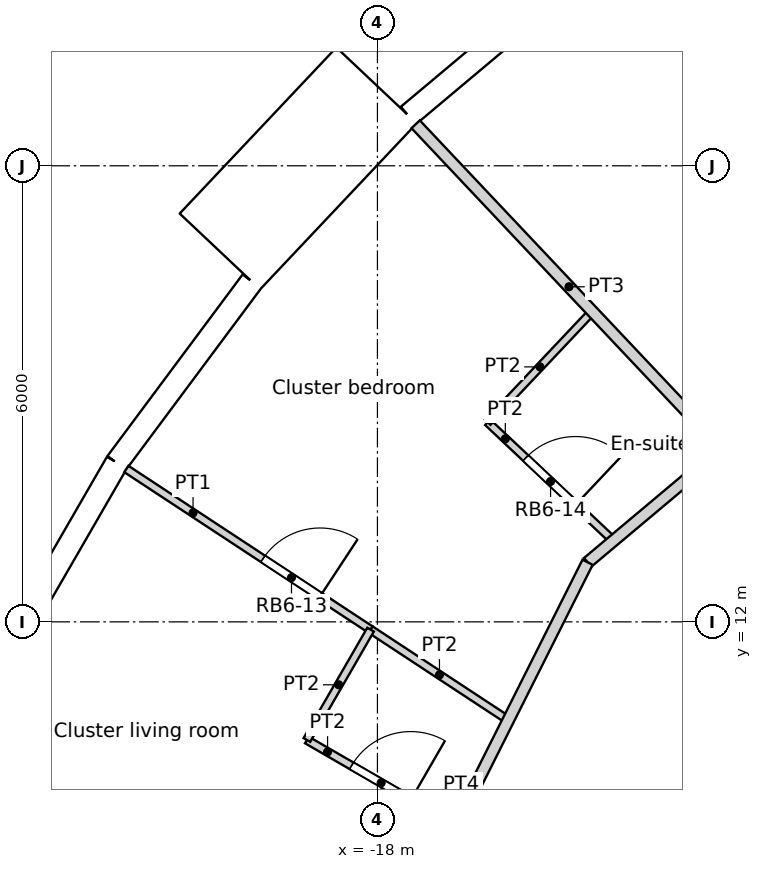
"""IFC4 building model, lengths in metres.
Left out: names, types, materials, properties, quantities, classifications, styles, units other than length and angle.
Written with IfcOpenShell. Run it as: python <this file> out.ifc"""

import sys

from ifc_helpers import new_model, si_unit, direction, frame, frame_2d, origin, origin_2d, place, context, subcontext, project, spatial, rectangle, circle, extrude, element, fill, save


model = new_model("IFC4")
c1 = context("Model", 3, precision=1e-05, world=origin(), true_north=direction((0.0, 1.0)))
c2 = subcontext(c1, "Body", "Model", "MODEL_VIEW")
j1 = project(units=[si_unit("LENGTHUNIT", "METRE"), si_unit("PLANEANGLEUNIT", "RADIAN")], contexts=[c1])
p1 = place(None, origin())
s1 = spatial("IfcSite", under=j1, at=p1, CompositionType="ELEMENT")
p2 = place(p1, origin())
s2 = spatial("IfcBuilding", under=s1, at=p2, CompositionType="ELEMENT")
p3 = place(p2, frame((0.0, 0.0, 180.0)))
s3 = spatial("IfcBuildingStorey", under=s2, at=p3, CompositionType="ELEMENT", Elevation=180.0)
for number, where, z_axis, x_axis in (
    (1, (-16.846, 17.855, 0.0), (0.0, 0.0, 1.0), (1.0, 0.0, 0.0)),
    (2, (-20.509, 13.489, 0.0), (0.0, 0.0, 1.0), (1.0, 0.0, 0.0)),
):
    element("IfcColumn", number, at=place(p3, frame(where, z_axis=z_axis, x_axis=x_axis)), inside=s3, PredefinedType="COLUMN", context=c2, shape_type="SweptSolid", body=[
        extrude(circle(Radius=0.6, at=origin_2d()), origin(), (0.0, 0.0, 1.0), 3.6),
    ])
p4 = place(p3, frame((-13.798, 12.802, 0.0), z_axis=(0.0, 0.0, 1.0), x_axis=(1.0, 0.0, 0.0)))
e3 = element("IfcColumn", 3, at=p4, inside=s3, PredefinedType="COLUMN", context=c2, shape_type="SweptSolid", body=[
    extrude(circle(Radius=0.65, at=origin_2d()), origin(), (0.0, 0.0, 1.0), 3.6),
])
p5 = place(p3, frame((-15.316, 20.573, 0.0), z_axis=(0.0, 0.0, 1.0), x_axis=(-0.766008913364, -0.642829950023, 0.0)))
e4 = element("IfcWall", 4, at=p5, inside=s3, PredefinedType="SOLIDWALL", context=c2, shape_type="SweptSolid", body=[
    extrude(rectangle(XDim=2.973, YDim=0.3, at=frame_2d((1.486, 0.0))), origin(), (0.0, 0.0, 1.0), 3.3),
])
p6 = place(p5, frame((1.486, 0.0, 1.55)))
e5 = element("IfcOpeningElement", 5, at=p6, cuts=e4, PredefinedType="OPENING", context=c2, shape_type="SweptSolid", body=[
    extrude(circle(Radius=0.9, at=origin_2d()), frame((0.0, 0.16, 0.0), z_axis=(0.0, -1.0, 0.0), x_axis=(1.0, 0.0, 0.0)), (0.0, 0.0, 1.0), 0.32),
])
p7 = place(p3, frame((-18.013, 19.056, -0.3), z_axis=(0.0, 0.0, 1.0), x_axis=(-0.686217177108, -0.727396718334, 0.0)))
e6 = element("IfcWall", 6, at=p7, inside=s3, PredefinedType="ELEMENTEDWALL", context=c2, shape_type="SweptSolid", body=[
    extrude(rectangle(XDim=3.0, YDim=1.45, at=frame_2d((1.5, 0.0))), origin(), (0.0, 0.0, 1.0), 3.6),
])
p8 = place(p7, frame((1.5, 0.0, 1.85)))
e7 = element("IfcOpeningElement", 7, at=p8, cuts=e6, PredefinedType="OPENING", context=c2, shape_type="SweptSolid", body=[
    extrude(circle(Radius=0.9, at=origin_2d()), frame((0.0, 0.735, 0.0), z_axis=(0.0, -1.0, 0.0), x_axis=(1.0, 0.0, 0.0)), (0.0, 0.0, 1.0), 1.47),
])
p9 = place(p3, frame((-19.653, 16.478, 0.0), z_axis=(0.0, 0.0, 1.0), x_axis=(-0.597197580538, -0.80209416517, 0.0)))
e8 = element("IfcWall", 8, at=p9, inside=s3, PredefinedType="SOLIDWALL", context=c2, shape_type="SweptSolid", body=[
    extrude(rectangle(XDim=2.973, YDim=0.3, at=frame_2d((1.486, 0.0))), origin(), (0.0, 0.0, 1.0), 3.3),
])
p10 = place(p9, frame((1.486, 0.0, 1.55)))
e9 = element("IfcOpeningElement", 9, at=p10, cuts=e8, PredefinedType="OPENING", context=c2, shape_type="SweptSolid", body=[
    extrude(circle(Radius=0.9, at=origin_2d()), frame((0.0, 0.16, 0.0), z_axis=(0.0, -1.0, 0.0), x_axis=(1.0, 0.0, 0.0)), (0.0, 0.0, 1.0), 0.32),
])
p11 = place(p3, frame((-21.428, 14.094, 0.0), z_axis=(0.0, 0.0, 1.0), x_axis=(-0.499954672104, -0.866051572276, 0.0)))
e10 = element("IfcWall", 10, at=p11, inside=s3, PredefinedType="SOLIDWALL", context=c2, shape_type="SweptSolid", body=[
    extrude(rectangle(XDim=2.973, YDim=0.3, at=frame_2d((1.486, 0.0))), origin(), (0.0, 0.0, 1.0), 3.3),
])
p12 = place(p11, frame((1.486, 0.0, 1.55)))
e11 = element("IfcOpeningElement", 11, at=p12, cuts=e10, PredefinedType="OPENING", context=c2, shape_type="SweptSolid", body=[
    extrude(circle(Radius=0.9, at=origin_2d()), frame((0.0, 0.16, 0.0), z_axis=(0.0, -1.0, 0.0), x_axis=(1.0, 0.0, 0.0)), (0.0, 0.0, 1.0), 0.32),
])
p13 = place(p3, frame((-15.234, 12.783, 0.0), z_axis=(0.0, 0.0, 1.0), x_axis=(0.765968036922, 0.642878656058, 0.0)))
e12 = element("IfcWall", 12, at=p13, inside=s3, PredefinedType="PARTITIONING", context=c2, shape_type="SweptSolid", body=[
    extrude(rectangle(XDim=6.906, YDim=0.15, at=frame_2d((3.453, 0.0))), origin(), (0.0, 0.0, 1.0), 3.3),
])
p14 = place(p3, frame((-19.351, 4.586, 0.0), z_axis=(0.0, 0.0, 1.0), x_axis=(0.44867140262, 0.893696801198, 0.0)))
e13 = element("IfcWall", 13, at=p14, inside=s3, PredefinedType="PARTITIONING", context=c2, shape_type="SweptSolid", body=[
    extrude(rectangle(XDim=9.174, YDim=0.15, at=frame_2d((4.587, 0.0))), origin(), (0.0, 0.0, 1.0), 3.3),
])
p15 = place(p14, frame((0.615, 0.0, 0.0)))
e14 = element("IfcOpeningElement", 14, at=p15, cuts=e13, PredefinedType="OPENING", context=c2, shape_type="SweptSolid", body=[
    extrude(rectangle(XDim=1.1, YDim=2.1, at=frame_2d((0.55, 1.05))), frame((0.0, 0.075, 0.0), z_axis=(0.0, -1.0, 0.0), x_axis=(1.0, 0.0, 0.0)), (0.0, 0.0, 1.0), 0.15),
])
p16 = place(p3, frame((-17.497, 18.546, 0.0), z_axis=(0.0, 0.0, 1.0), x_axis=(0.68633567779, -0.727284907991, 0.0)))
e15 = element("IfcWall", 15, at=p16, inside=s3, PredefinedType="PARTITIONING", context=c2, shape_type="SweptSolid", body=[
    extrude(rectangle(XDim=5.879, YDim=0.15, at=frame_2d((2.939, 0.0))), origin(), (0.0, 0.0, 1.0), 3.3),
])
p17 = place(p3, frame((-18.928, 10.446, 0.0), z_axis=(0.0, 0.0, 1.0), x_axis=(0.499835922194, 0.866120113428, 0.0)))
e16 = element("IfcWall", 16, at=p17, inside=s3, PredefinedType="PARTITIONING", context=c2, shape_type="SweptSolid", body=[
    extrude(rectangle(XDim=1.676, YDim=0.1, at=frame_2d((0.838, 0.0))), origin(), (0.0, 0.0, 1.0), 3.3),
])
p18 = place(p3, frame((-18.928, 10.446, 0.0), z_axis=(0.0, 0.0, 1.0), x_axis=(0.865942177038, -0.500144125255, 0.0)))
e17 = element("IfcWall", 17, at=p18, inside=s3, PredefinedType="PARTITIONING", context=c2, shape_type="SweptSolid", body=[
    extrude(rectangle(XDim=2.255, YDim=0.1, at=frame_2d((1.127, 0.0))), origin(), (0.0, 0.0, 1.0), 3.3),
])
p19 = place(p18, frame((0.678, 0.0, 0.0)))
e18 = element("IfcOpeningElement", 18, at=p19, cuts=e17, PredefinedType="OPENING", context=c2, shape_type="SweptSolid", body=[
    extrude(rectangle(XDim=0.9, YDim=2.0, at=frame_2d((0.45, 1.0))), frame((0.0, 0.05, 0.0), z_axis=(0.0, -1.0, 0.0), x_axis=(1.0, 0.0, 0.0)), (0.0, 0.0, 1.0), 0.1),
])
p20 = place(p3, frame((-21.303, 14.011, 0.0), z_axis=(0.0, 0.0, 1.0), x_axis=(0.835501457061, -0.549488230309, 0.0)))
e19 = element("IfcWall", 19, at=p20, inside=s3, PredefinedType="PARTITIONING", context=c2, shape_type="SweptSolid", body=[
    extrude(rectangle(XDim=3.845, YDim=0.1, at=frame_2d((1.923, 0.0))), origin(), (0.0, 0.0, 1.0), 3.3),
])
p21 = place(p20, frame((2.15, 0.0, 0.0)))
e20 = element("IfcOpeningElement", 20, at=p21, cuts=e19, PredefinedType="OPENING", context=c2, shape_type="SweptSolid", body=[
    extrude(rectangle(XDim=0.9, YDim=2.1, at=frame_2d((0.45, 1.05))), frame((0.0, 0.05, 0.0), z_axis=(0.0, -1.0, 0.0), x_axis=(1.0, 0.0, 0.0)), (0.0, 0.0, 1.0), 0.1),
])
p22 = place(p3, frame((-18.09, 11.898, 0.0), z_axis=(0.0, 0.0, 1.0), x_axis=(0.835463324296, -0.549546207116, 0.0)))
e21 = element("IfcWall", 21, at=p22, inside=s3, PredefinedType="PARTITIONING", context=c2, shape_type="SweptSolid", body=[
    extrude(rectangle(XDim=2.169, YDim=0.1, at=frame_2d((1.084, 0.0))), origin(), (0.0, 0.0, 1.0), 3.3),
])
p23 = place(p3, frame((-16.549, 14.626, 0.0), z_axis=(0.0, 0.0, 1.0), x_axis=(0.686337209023, 0.727283462971, 0.0)))
e22 = element("IfcWall", 22, at=p23, inside=s3, PredefinedType="PARTITIONING", context=c2, shape_type="SweptSolid", body=[
    extrude(rectangle(XDim=2.003, YDim=0.1, at=frame_2d((1.002, 0.0))), origin(), (0.0, 0.0, 1.0), 3.3),
])
p24 = place(p3, frame((-16.549, 14.626, 0.0), z_axis=(0.0, 0.0, 1.0), x_axis=(0.727754926423, -0.68583727448, 0.0)))
e23 = element("IfcWall", 23, at=p24, inside=s3, PredefinedType="PARTITIONING", context=c2, shape_type="SweptSolid", body=[
    extrude(rectangle(XDim=2.271, YDim=0.1, at=frame_2d((1.136, 0.0))), origin(), (0.0, 0.0, 1.0), 3.3),
])
p25 = place(p24, frame((0.686, 0.0, 0.0)))
e24 = element("IfcOpeningElement", 24, at=p25, cuts=e23, PredefinedType="OPENING", context=c2, shape_type="SweptSolid", body=[
    extrude(rectangle(XDim=0.9, YDim=2.04, at=frame_2d((0.45, 1.02))), frame((0.0, 0.05, 0.0), z_axis=(0.0, -1.0, 0.0), x_axis=(1.0, 0.0, 0.0)), (0.0, 0.0, 1.0), 0.1),
])
p26 = place(p6, origin())
e25 = element("IfcWindow", 25, at=p26, inside=s3, PartitioningType="SINGLE_PANEL", PredefinedType="WINDOW", context=c2, shape_type="SweptSolid", body=[
    extrude(circle(Radius=0.9, at=origin_2d()), frame((0.0, 0.12, 0.0), z_axis=(0.0, -1.0, 0.0), x_axis=(1.0, 0.0, 0.0)), (0.0, 0.0, 1.0), 0.1),
])
fill(e5, e25)
p27 = place(p8, origin())
e26 = element("IfcWindow", 26, at=p27, inside=s3, PartitioningType="SINGLE_PANEL", PredefinedType="WINDOW", context=c2, shape_type="SweptSolid", body=[
    extrude(circle(Radius=0.9, at=origin_2d()), frame((0.0, 0.695, 0.0), z_axis=(0.0, -1.0, 0.0), x_axis=(1.0, 0.0, 0.0)), (0.0, 0.0, 1.0), 0.1),
])
fill(e7, e26)
p28 = place(p10, origin())
e27 = element("IfcWindow", 27, at=p28, inside=s3, PartitioningType="SINGLE_PANEL", PredefinedType="WINDOW", context=c2, shape_type="SweptSolid", body=[
    extrude(circle(Radius=0.9, at=origin_2d()), frame((0.0, 0.12, 0.0), z_axis=(0.0, -1.0, 0.0), x_axis=(1.0, 0.0, 0.0)), (0.0, 0.0, 1.0), 0.1),
])
fill(e9, e27)
p29 = place(p12, origin())
e28 = element("IfcWindow", 28, at=p29, inside=s3, PartitioningType="SINGLE_PANEL", PredefinedType="WINDOW", context=c2, shape_type="SweptSolid", body=[
    extrude(circle(Radius=0.9, at=origin_2d()), frame((0.0, 0.12, 0.0), z_axis=(0.0, -1.0, 0.0), x_axis=(1.0, 0.0, 0.0)), (0.0, 0.0, 1.0), 0.1),
])
fill(e11, e28)
p30 = place(p19, origin())
e29 = element("IfcDoor", 29, at=p30, inside=s3, OperationType="SINGLE_SWING_RIGHT", PredefinedType="DOOR", context=c2, shape_type="SweptSolid", body=[
    extrude(rectangle(XDim=0.9, YDim=2.0, at=frame_2d((0.45, 1.0))), frame((0.0, 0.025, 0.0), z_axis=(0.0, -1.0, 0.0), x_axis=(1.0, 0.0, 0.0)), (0.0, 0.0, 1.0), 0.05),
])
fill(e18, e29)
p31 = place(p21, origin())
e30 = element("IfcDoor", 30, at=p31, inside=s3, OperationType="SINGLE_SWING_RIGHT", PredefinedType="DOOR", context=c2, shape_type="SweptSolid", body=[
    extrude(rectangle(XDim=0.9, YDim=2.1, at=frame_2d((0.45, 1.05))), frame((0.0, 0.025, 0.0), z_axis=(0.0, -1.0, 0.0), x_axis=(1.0, 0.0, 0.0)), (0.0, 0.0, 1.0), 0.05),
])
fill(e20, e30)
p32 = place(p25, origin())
e31 = element("IfcDoor", 31, at=p32, inside=s3, OperationType="SINGLE_SWING_RIGHT", PredefinedType="DOOR", context=c2, shape_type="SweptSolid", body=[
    extrude(rectangle(XDim=0.9, YDim=2.04, at=frame_2d((0.45, 1.02))), frame((0.0, 0.025, 0.0), z_axis=(0.0, -1.0, 0.0), x_axis=(1.0, 0.0, 0.0)), (0.0, 0.0, 1.0), 0.05),
])
fill(e24, e31)
save(model, sys.argv[1])
